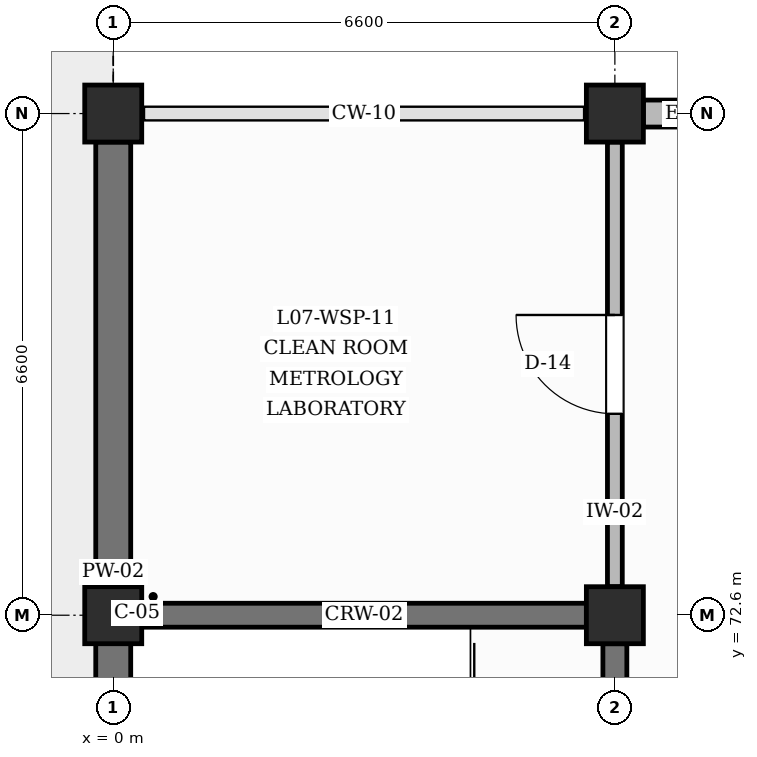
"""IFC4 building model, lengths in metres.
Left out: names, types, materials, properties, quantities, classifications, styles, units other than length and angle.
Written with IfcOpenShell. Run it as: python <this file> out.ifc"""

import sys

from ifc_helpers import new_model, si_unit, direction, frame, frame_2d, origin, origin_2d, place, context, subcontext, project, spatial, rectangle, extrude, element, fill, save


model = new_model("IFC4")
c1 = context("Model", 3, precision=1e-05, world=origin(), true_north=direction((0.0, 1.0)))
c2 = subcontext(c1, "Body", "Model", "MODEL_VIEW")
j1 = project(units=[si_unit("LENGTHUNIT", "METRE"), si_unit("PLANEANGLEUNIT", "RADIAN")], contexts=[c1])
p1 = place(None, origin())
s1 = spatial("IfcSite", under=j1, at=p1, CompositionType="ELEMENT")
p2 = place(p1, origin())
s2 = spatial("IfcBuilding", under=s1, at=p2, CompositionType="ELEMENT")
p3 = place(p2, frame((0.0, 0.0, 31.2)))
s3 = spatial("IfcBuildingStorey", under=s2, at=p3, CompositionType="ELEMENT", Elevation=31.2)
for number, where, z_axis, x_axis in (
    (1, (0.0, 72.6, 0.0), (0.0, 0.0, 1.0), (1.0, 0.0, 0.0)),
    (2, (0.0, 79.2, 0.0), (0.0, 0.0, 1.0), (1.0, 0.0, 0.0)),
    (3, (6.6, 72.6, 0.0), (0.0, 0.0, 1.0), (1.0, 0.0, 0.0)),
    (4, (6.6, 79.2, 0.0), (0.0, 0.0, 1.0), (1.0, 0.0, 0.0)),
):
    element("IfcColumn", number, at=place(p3, frame(where, z_axis=z_axis, x_axis=x_axis)), inside=s3, PredefinedType="COLUMN", context=c2, shape_type="SweptSolid", body=[
        extrude(rectangle(XDim=0.75, YDim=0.75, at=origin_2d()), origin(), (0.0, 0.0, 1.0), 4.2),
    ])
p4 = place(p3, frame((0.0, 66.375, 0.0), z_axis=(0.0, 0.0, 1.0), x_axis=(0.0, 1.0, 0.0)))
e5 = element("IfcWall", 5, at=p4, inside=s3, PredefinedType="SOLIDWALL", context=c2, shape_type="SweptSolid", body=[
    extrude(rectangle(XDim=5.85, YDim=0.46, at=frame_2d((2.925, 0.0))), origin(), (0.0, 0.0, 1.0), 3.28),
])
p5 = place(p3, frame((0.0, 72.975, 0.0), z_axis=(0.0, 0.0, 1.0), x_axis=(0.0, 1.0, 0.0)))
e6 = element("IfcWall", 6, at=p5, inside=s3, PredefinedType="SOLIDWALL", context=c2, shape_type="SweptSolid", body=[
    extrude(rectangle(XDim=5.85, YDim=0.46, at=frame_2d((2.925, 0.0))), origin(), (0.0, 0.0, 1.0), 3.28),
])
p6 = place(p3, frame((6.975, 79.2, 0.0), z_axis=(0.0, 0.0, 1.0), x_axis=(1.0, 0.0, 0.0)))
e7 = element("IfcWall", 7, at=p6, inside=s3, PredefinedType="SOLIDWALL", context=c2, shape_type="SweptSolid", body=[
    extrude(rectangle(XDim=5.85, YDim=0.355, at=frame_2d((2.925, 0.0))), origin(), (0.0, 0.0, 1.0), 3.28),
])
p7 = place(p6, frame((1.805, 0.0, 0.95)))
e8 = element("IfcOpeningElement", 8, at=p7, cuts=e7, PredefinedType="OPENING", context=c2, shape_type="SweptSolid", body=[
    extrude(rectangle(XDim=2.24, YDim=1.96, at=frame_2d((1.12, 0.98))), frame((0.0, 0.188, 0.0), z_axis=(0.0, -1.0, 0.0), x_axis=(1.0, 0.0, 0.0)), (0.0, 0.0, 1.0), 0.375),
])
p8 = place(p3, frame((0.375, 72.6, 0.0), z_axis=(0.0, 0.0, 1.0), x_axis=(1.0, 0.0, 0.0)))
e9 = element("IfcWall", 9, at=p8, inside=s3, PredefinedType="SHEAR", context=c2, shape_type="SweptSolid", body=[
    extrude(rectangle(XDim=5.85, YDim=0.315, at=frame_2d((2.925, 0.0))), origin(), (0.0, 0.0, 1.0), 3.18),
])
p9 = place(p3, frame((6.6, 66.375, 0.0), z_axis=(0.0, 0.0, 1.0), x_axis=(0.0, 1.0, 0.0)))
e10 = element("IfcWall", 10, at=p9, inside=s3, PredefinedType="SHEAR", context=c2, shape_type="SweptSolid", body=[
    extrude(rectangle(XDim=5.85, YDim=0.315, at=frame_2d((2.925, 0.0))), origin(), (0.0, 0.0, 1.0), 3.18),
])
p10 = place(p9, frame((2.375, 0.0, 0.0)))
e11 = element("IfcOpeningElement", 11, at=p10, cuts=e10, PredefinedType="OPENING", context=c2, shape_type="SweptSolid", body=[
    extrude(rectangle(XDim=1.1, YDim=2.15, at=frame_2d((0.55, 1.075))), frame((0.0, 0.167, 0.0), z_axis=(0.0, -1.0, 0.0), x_axis=(1.0, 0.0, 0.0)), (0.0, 0.0, 1.0), 0.335),
])
p11 = place(p3, frame((6.6, 72.975, 0.0), z_axis=(0.0, 0.0, 1.0), x_axis=(0.0, 1.0, 0.0)))
e12 = element("IfcWall", 12, at=p11, inside=s3, PredefinedType="PARTITIONING", context=c2, shape_type="SweptSolid", body=[
    extrude(rectangle(XDim=5.85, YDim=0.195, at=frame_2d((2.925, 0.0))), origin(), (0.0, 0.0, 1.0), 3.18),
])
p12 = place(p11, frame((2.275, 0.0, 0.0)))
e13 = element("IfcOpeningElement", 13, at=p12, cuts=e12, PredefinedType="OPENING", context=c2, shape_type="SweptSolid", body=[
    extrude(rectangle(XDim=1.3, YDim=2.3, at=frame_2d((0.65, 1.15))), frame((0.0, 0.107, 0.0), z_axis=(0.0, -1.0, 0.0), x_axis=(1.0, 0.0, 0.0)), (0.0, 0.0, 1.0), 0.215),
])
p13 = place(p12, origin())
e14 = element("IfcDoor", 14, at=p13, inside=s3, OperationType="SINGLE_SWING_RIGHT", PredefinedType="DOOR", context=c2, shape_type="SweptSolid", body=[
    extrude(rectangle(XDim=1.3, YDim=2.3, at=frame_2d((0.65, 1.15))), frame((0.0, 0.025, 0.0), z_axis=(0.0, -1.0, 0.0), x_axis=(1.0, 0.0, 0.0)), (0.0, 0.0, 1.0), 0.05),
])
fill(e13, e14)
save(model, sys.argv[1])
